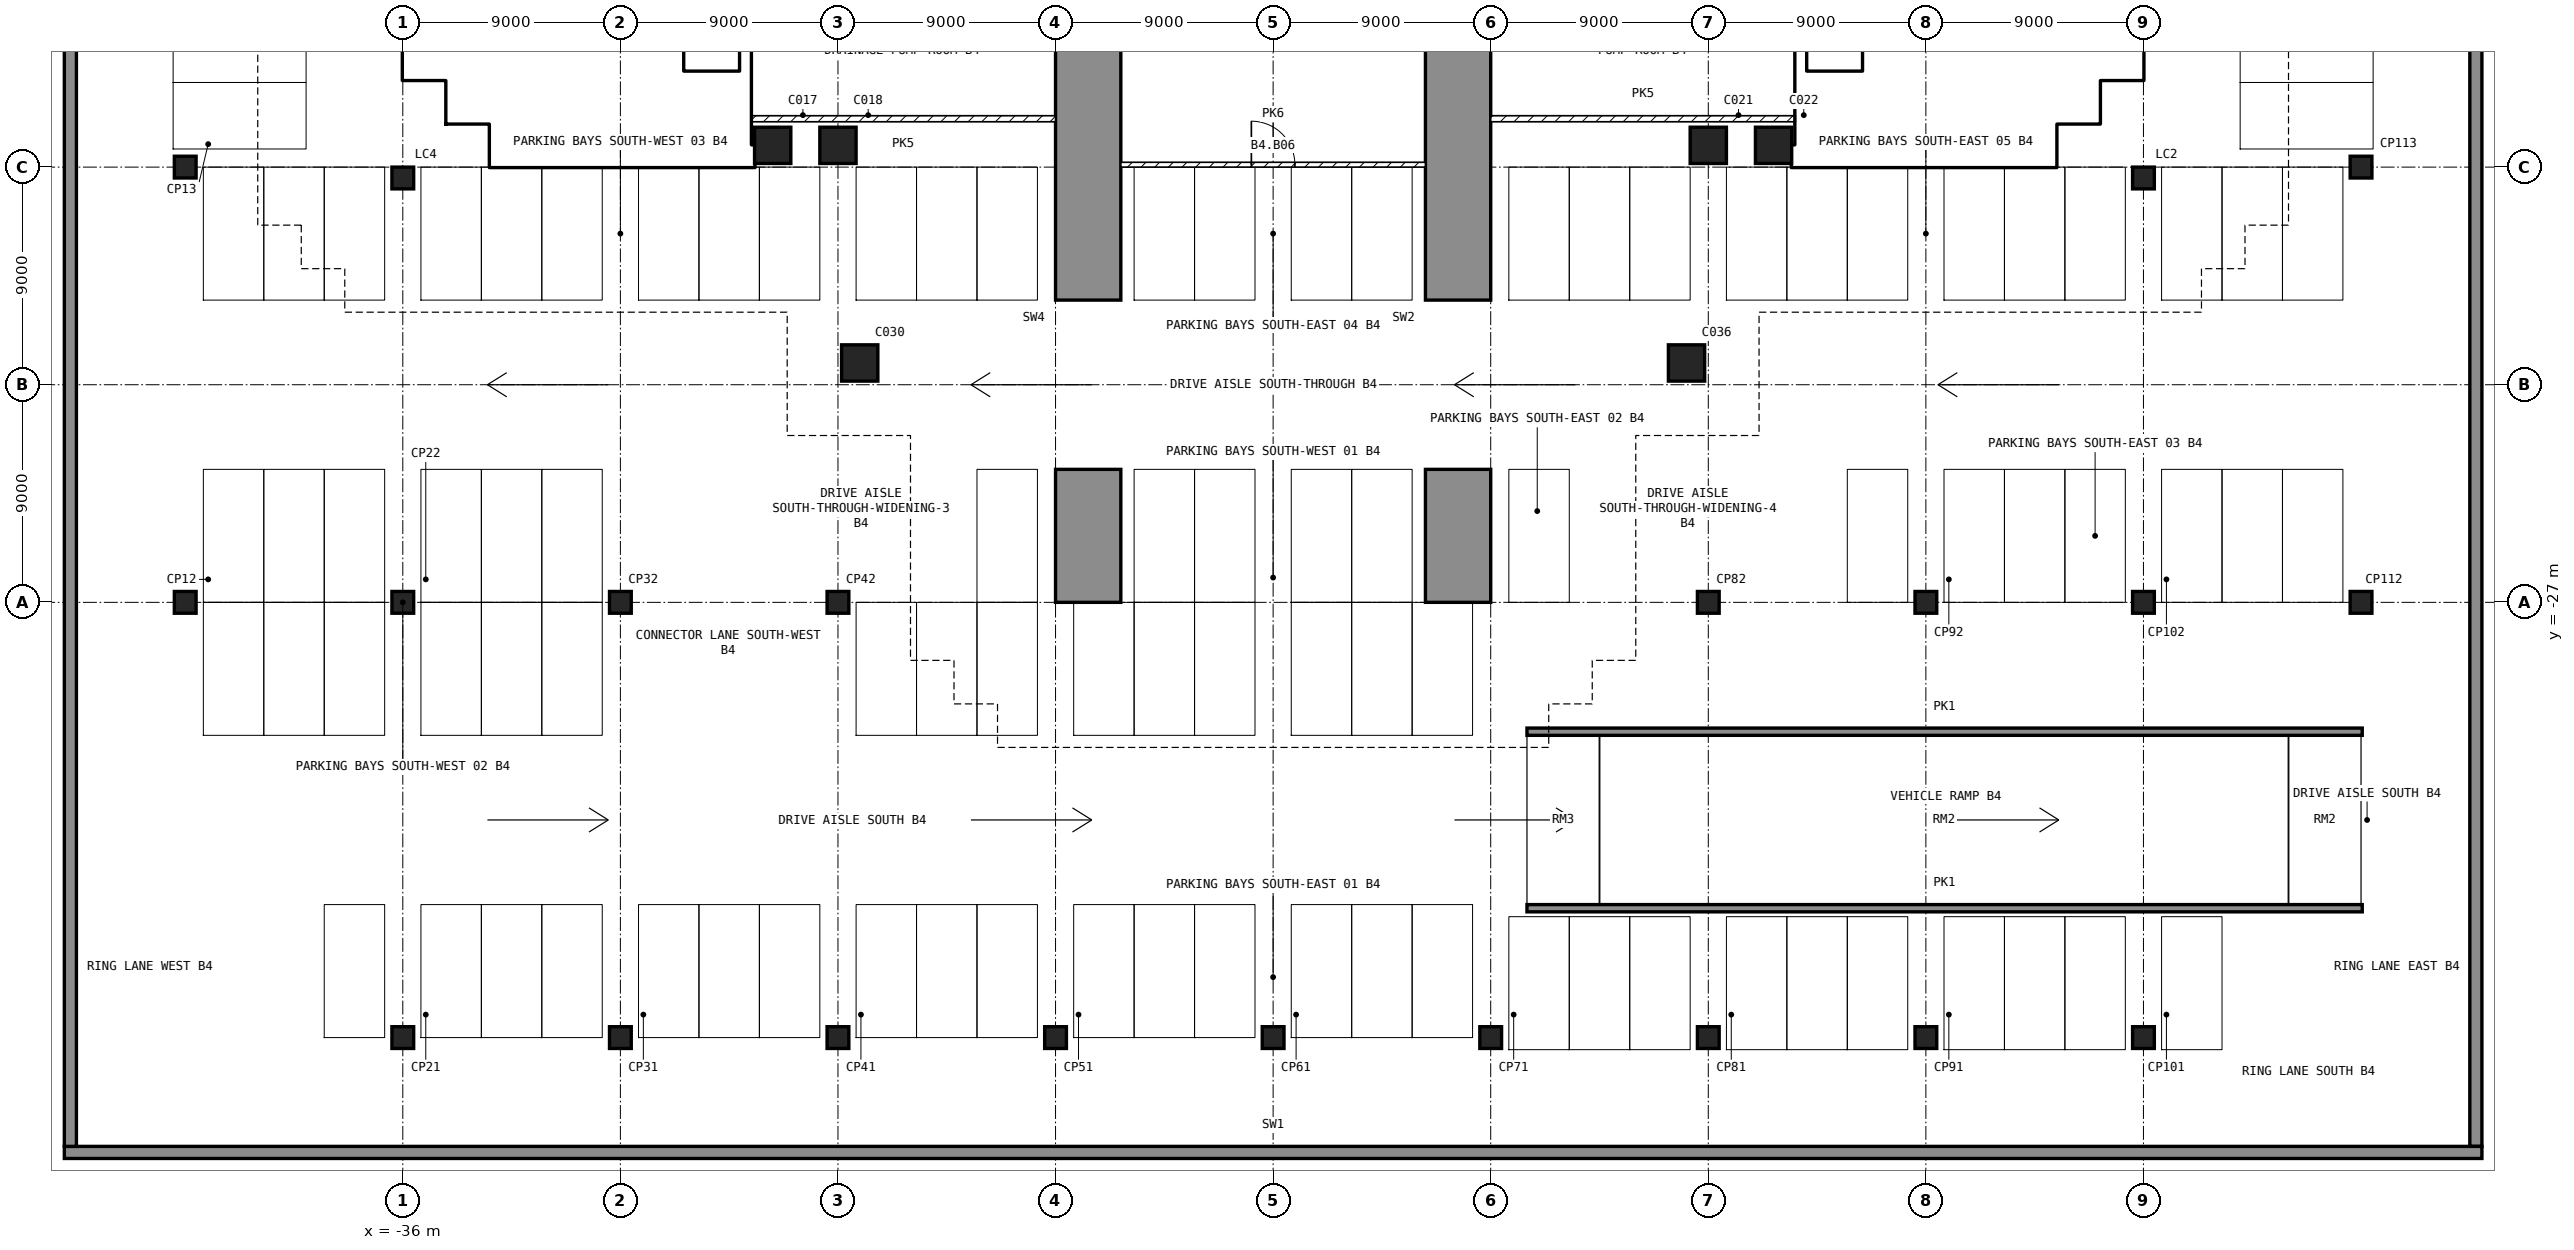
"""IFC4 building model, lengths in metres.
Left out: names, types, materials, properties, quantities, classifications, styles, units other than length and angle.
Written with IfcOpenShell. Run it as: python <this file> out.ifc"""

import sys

from ifc_helpers import new_model, si_unit, direction, frame, frame_2d, origin, origin_2d, place, context, subcontext, project, spatial, polyline, rectangle, outline, extrude, element, fill, save


model = new_model("IFC4")
c1 = context("Model", 3, precision=1e-05, world=origin(), true_north=direction((0.0, 1.0)))
c2 = subcontext(c1, "Body", "Model", "MODEL_VIEW")
j1 = project(units=[si_unit("LENGTHUNIT", "METRE"), si_unit("PLANEANGLEUNIT", "RADIAN")], contexts=[c1])
p1 = place(None, origin())
s1 = spatial("IfcSite", under=j1, at=p1, CompositionType="ELEMENT")
p2 = place(p1, origin())
s2 = spatial("IfcBuilding", under=s1, at=p2, CompositionType="ELEMENT")
p3 = place(p2, frame((0.0, 0.0, -17.1)))
s3 = spatial("IfcBuildingStorey", under=s2, at=p3, CompositionType="ELEMENT", Elevation=-17.1)
p4 = place(p3, frame((-50.0, -49.75, -0.3), z_axis=(0.0, 0.0, 1.0), x_axis=(1.0, 0.0, 0.0)))
e1 = element("IfcWall", 1, at=p4, inside=s3, PredefinedType="SOLIDWALL", context=c2, shape_type="SweptSolid", body=[
    extrude(rectangle(XDim=100.0, YDim=0.5, at=frame_2d((50.0, 0.0))), origin(), (0.0, 0.0, 1.0), 4.2),
])
for number, where, z_axis, x_axis in (
    (2, (49.75, -49.5, -0.3), (0.0, 0.0, 1.0), (0.0, 1.0, 0.0)),
    (3, (-49.75, -49.5, -0.3), (0.0, 0.0, 1.0), (0.0, 1.0, 0.0)),
):
    element("IfcWall", number, at=place(p3, frame(where, z_axis=z_axis, x_axis=x_axis)), inside=s3, PredefinedType="SOLIDWALL", context=c2, shape_type="SweptSolid", body=[
        extrude(rectangle(XDim=99.0, YDim=0.5, at=frame_2d((49.5, 0.0))), origin(), (0.0, 0.0, 1.0), 4.2),
    ])
for number, where, z_axis, x_axis in (
    (4, (-20.7, -8.1, 0.0), (0.0, 0.0, 1.0), (1.0, 0.0, 0.0)),
    (5, (-18.0, -8.1, 0.0), (0.0, 0.0, 1.0), (1.0, 0.0, 0.0)),
    (6, (18.0, -8.1, 0.0), (0.0, 0.0, 1.0), (1.0, 0.0, 0.0)),
    (7, (20.7, -8.1, 0.0), (0.0, 0.0, 1.0), (1.0, 0.0, 0.0)),
    (8, (-17.1, -17.1, 0.0), (0.0, 0.0, 1.0), (1.0, 0.0, 0.0)),
    (9, (17.1, -17.1, 0.0), (0.0, 0.0, 1.0), (1.0, 0.0, 0.0)),
):
    element("IfcColumn", number, at=place(p3, frame(where, z_axis=z_axis, x_axis=x_axis)), inside=s3, PredefinedType="COLUMN", context=c2, shape_type="SweptSolid", body=[
        extrude(rectangle(XDim=1.5, YDim=1.5, at=origin_2d()), origin(), (0.0, 0.0, 1.0), 3.9),
    ])
for number, where, z_axis, x_axis in (
    (10, (-45.0, -27.0, -0.3), (0.0, 0.0, 1.0), (1.0, 0.0, 0.0)),
    (11, (-45.0, -9.0, -0.3), (0.0, 0.0, 1.0), (1.0, 0.0, 0.0)),
    (12, (-36.0, -45.0, -0.3), (0.0, 0.0, 1.0), (1.0, 0.0, 0.0)),
    (13, (-36.0, -27.0, -0.3), (0.0, 0.0, 1.0), (1.0, 0.0, 0.0)),
    (14, (-27.0, -45.0, -0.3), (0.0, 0.0, 1.0), (1.0, 0.0, 0.0)),
    (15, (-27.0, -27.0, -0.3), (0.0, 0.0, 1.0), (1.0, 0.0, 0.0)),
    (16, (-18.0, -45.0, -0.3), (0.0, 0.0, 1.0), (1.0, 0.0, 0.0)),
    (17, (-18.0, -27.0, -0.3), (0.0, 0.0, 1.0), (1.0, 0.0, 0.0)),
    (18, (-9.0, -45.0, -0.3), (0.0, 0.0, 1.0), (1.0, 0.0, 0.0)),
    (19, (0.0, -45.0, -0.3), (0.0, 0.0, 1.0), (1.0, 0.0, 0.0)),
    (20, (9.0, -45.0, -0.3), (0.0, 0.0, 1.0), (1.0, 0.0, 0.0)),
    (21, (18.0, -45.0, -0.3), (0.0, 0.0, 1.0), (1.0, 0.0, 0.0)),
    (22, (18.0, -27.0, -0.3), (0.0, 0.0, 1.0), (1.0, 0.0, 0.0)),
    (23, (27.0, -45.0, -0.3), (0.0, 0.0, 1.0), (1.0, 0.0, 0.0)),
    (24, (27.0, -27.0, -0.3), (0.0, 0.0, 1.0), (1.0, 0.0, 0.0)),
    (25, (36.0, -45.0, -0.3), (0.0, 0.0, 1.0), (1.0, 0.0, 0.0)),
    (26, (36.0, -27.0, -0.3), (0.0, 0.0, 1.0), (1.0, 0.0, 0.0)),
    (27, (45.0, -27.0, -0.3), (0.0, 0.0, 1.0), (1.0, 0.0, 0.0)),
    (28, (45.0, -9.0, -0.3), (0.0, 0.0, 1.0), (1.0, 0.0, 0.0)),
):
    element("IfcColumn", number, at=place(p3, frame(where, z_axis=z_axis, x_axis=x_axis)), inside=s3, PredefinedType="COLUMN", context=c2, shape_type="SweptSolid", body=[
        extrude(rectangle(XDim=0.9, YDim=0.9, at=origin_2d()), origin(), (0.0, 0.0, 1.0), 4.2),
    ])
for number, where, z_axis, x_axis in (
    (29, (36.0, -9.45, 0.0), (0.0, 0.0, 1.0), (1.0, 0.0, 0.0)),
    (30, (-36.0, -9.45, 0.0), (0.0, 0.0, 1.0), (1.0, 0.0, 0.0)),
):
    element("IfcColumn", number, at=place(p3, frame(where, z_axis=z_axis, x_axis=x_axis)), inside=s3, PredefinedType="COLUMN", context=c2, shape_type="SweptSolid", body=[
        extrude(rectangle(XDim=0.9, YDim=0.9, at=origin_2d()), origin(), (0.0, 0.0, 1.0), 3.9),
    ])
for number, where, z_axis, x_axis in (
    (31, (6.3, -27.0, 0.0), (1.0, 0.0, 0.0), (0.0, 1.0, 0.0)),
    (32, (-9.0, -27.0, 0.0), (1.0, 0.0, 0.0), (0.0, 1.0, 0.0)),
):
    element("IfcWall", number, at=place(p3, frame(where, z_axis=z_axis, x_axis=x_axis)), inside=s3, PredefinedType="SOLIDWALL", context=c2, shape_type="SweptSolid", body=[
        extrude(outline(polyline([(0.0, 0.0), (5.5, 0.0), (5.5, 3.0), (12.5, 3.0), (12.5, 0.0), (23.5, 0.0), (23.5, 3.9), (0.0, 3.9), (0.0, 0.0)])), origin(), (0.0, 0.0, 1.0), 2.7),
    ])
p5 = place(p3, frame((21.45, -8.55, 0.0), z_axis=(0.0, 0.0, 1.0), x_axis=(1.0, 0.0, 0.0)))
e33 = element("IfcWall", 33, at=p5, inside=s3, PredefinedType="SHEAR", context=c2, shape_type="SweptSolid", body=[
    extrude(rectangle(XDim=10.95, YDim=0.9, at=frame_2d((5.475, 0.0))), origin(), (0.0, 0.0, 1.0), 3.9),
])
for number, where, z_axis, x_axis in (
    (34, (31.95, -8.1, 0.0), (0.0, 0.0, 1.0), (0.0, 1.0, 0.0)),
    (35, (32.4, -6.75, 0.0), (0.0, 0.0, 1.0), (1.0, 0.0, 0.0)),
):
    element("IfcWall", number, at=place(p3, frame(where, z_axis=z_axis, x_axis=x_axis)), inside=s3, PredefinedType="SHEAR", context=c2, shape_type="SweptSolid", body=[
        extrude(rectangle(XDim=1.8, YDim=0.9, at=frame_2d((0.9, 0.0))), origin(), (0.0, 0.0, 1.0), 3.9),
    ])
p6 = place(p3, frame((33.75, -6.3, 0.0), z_axis=(0.0, 0.0, 1.0), x_axis=(0.0, 1.0, 0.0)))
e36 = element("IfcWall", 36, at=p6, inside=s3, PredefinedType="SHEAR", context=c2, shape_type="SweptSolid", body=[
    extrude(rectangle(XDim=2.25, YDim=0.9, at=frame_2d((1.125, 0.0))), origin(), (0.0, 0.0, 1.0), 3.9),
])
p7 = place(p3, frame((34.2, -4.95, 0.0), z_axis=(0.0, 0.0, 1.0), x_axis=(1.0, 0.0, 0.0)))
e37 = element("IfcWall", 37, at=p7, inside=s3, PredefinedType="SHEAR", context=c2, shape_type="SweptSolid", body=[
    extrude(rectangle(XDim=1.8, YDim=0.9, at=frame_2d((0.9, 0.0))), origin(), (0.0, 0.0, 1.0), 3.9),
])
p8 = place(p3, frame((35.55, -4.5, 0.0), z_axis=(0.0, 0.0, 1.0), x_axis=(0.0, 1.0, 0.0)))
e38 = element("IfcWall", 38, at=p8, inside=s3, PredefinedType="SHEAR", context=c2, shape_type="SweptSolid", body=[
    extrude(rectangle(XDim=9.9, YDim=0.9, at=frame_2d((4.95, 0.0))), origin(), (0.0, 0.0, 1.0), 3.9),
])
p9 = place(p3, frame((21.825, -8.1, 0.0), z_axis=(0.0, 0.0, 1.0), x_axis=(0.0, 1.0, 0.0)))
e39 = element("IfcWall", 39, at=p9, inside=s3, PredefinedType="SHEAR", context=c2, shape_type="SweptSolid", body=[
    extrude(rectangle(XDim=6.9, YDim=0.45, at=frame_2d((3.45, 0.0))), origin(), (0.0, 0.0, 1.0), 3.9),
])
p10 = place(p3, frame((24.5, -5.05, 0.0), z_axis=(0.0, 0.0, 1.0), x_axis=(0.0, 1.0, 0.0)))
e40 = element("IfcWall", 40, at=p10, inside=s3, PredefinedType="SOLIDWALL", context=c2, shape_type="SweptSolid", body=[
    extrude(rectangle(XDim=3.7, YDim=0.2, at=frame_2d((1.85, 0.0))), origin(), (0.0, 0.0, 1.0), 3.9),
])
p11 = place(p10, frame((0.1, 0.0, 0.0)))
e41 = element("IfcOpeningElement", 41, at=p11, cuts=e40, PredefinedType="OPENING", context=c2, shape_type="SweptSolid", body=[
    extrude(rectangle(XDim=0.8, YDim=2.1, at=frame_2d((0.4, 1.05))), frame((0.0, 0.11, 0.0), z_axis=(0.0, -1.0, 0.0), x_axis=(1.0, 0.0, 0.0)), (0.0, 0.0, 1.0), 0.22),
])
p12 = place(p3, frame((22.05, -5.15, 0.0), z_axis=(0.0, 0.0, 1.0), x_axis=(1.0, 0.0, 0.0)))
e42 = element("IfcWall", 42, at=p12, inside=s3, PredefinedType="SOLIDWALL", context=c2, shape_type="SweptSolid", body=[
    extrude(rectangle(XDim=6.3, YDim=0.2, at=frame_2d((3.15, 0.0))), origin(), (0.0, 0.0, 1.0), 3.9),
])
p13 = place(p12, frame((0.2, 0.0, 0.0)))
e43 = element("IfcOpeningElement", 43, at=p13, cuts=e42, PredefinedType="OPENING", context=c2, shape_type="SweptSolid", body=[
    extrude(rectangle(XDim=1.0, YDim=2.1, at=frame_2d((0.5, 1.05))), frame((0.0, 0.11, 0.0), z_axis=(0.0, -1.0, 0.0), x_axis=(1.0, 0.0, 0.0)), (0.0, 0.0, 1.0), 0.22),
])
p14 = place(p3, frame((28.25, -8.1, 0.0), z_axis=(0.0, 0.0, 1.0), x_axis=(0.0, 1.0, 0.0)))
e44 = element("IfcWall", 44, at=p14, inside=s3, PredefinedType="SOLIDWALL", context=c2, shape_type="SweptSolid", body=[
    extrude(rectangle(XDim=2.85, YDim=0.2, at=frame_2d((1.425, 0.0))), origin(), (0.0, 0.0, 1.0), 3.9),
])
p15 = place(p3, frame((-32.4, -8.55, 0.0), z_axis=(0.0, 0.0, 1.0), x_axis=(1.0, 0.0, 0.0)))
e45 = element("IfcWall", 45, at=p15, inside=s3, PredefinedType="SHEAR", context=c2, shape_type="SweptSolid", body=[
    extrude(rectangle(XDim=10.95, YDim=0.9, at=frame_2d((5.475, 0.0))), origin(), (0.0, 0.0, 1.0), 3.9),
])
for number, where, z_axis, x_axis in (
    (46, (-31.95, -8.1, 0.0), (0.0, 0.0, 1.0), (0.0, 1.0, 0.0)),
    (47, (-34.2, -6.75, 0.0), (0.0, 0.0, 1.0), (1.0, 0.0, 0.0)),
):
    element("IfcWall", number, at=place(p3, frame(where, z_axis=z_axis, x_axis=x_axis)), inside=s3, PredefinedType="SHEAR", context=c2, shape_type="SweptSolid", body=[
        extrude(rectangle(XDim=1.8, YDim=0.9, at=frame_2d((0.9, 0.0))), origin(), (0.0, 0.0, 1.0), 3.9),
    ])
p16 = place(p3, frame((-33.75, -6.3, 0.0), z_axis=(0.0, 0.0, 1.0), x_axis=(0.0, 1.0, 0.0)))
e48 = element("IfcWall", 48, at=p16, inside=s3, PredefinedType="SHEAR", context=c2, shape_type="SweptSolid", body=[
    extrude(rectangle(XDim=2.25, YDim=0.9, at=frame_2d((1.125, 0.0))), origin(), (0.0, 0.0, 1.0), 3.9),
])
p17 = place(p3, frame((-36.0, -4.95, 0.0), z_axis=(0.0, 0.0, 1.0), x_axis=(1.0, 0.0, 0.0)))
e49 = element("IfcWall", 49, at=p17, inside=s3, PredefinedType="SHEAR", context=c2, shape_type="SweptSolid", body=[
    extrude(rectangle(XDim=1.8, YDim=0.9, at=frame_2d((0.9, 0.0))), origin(), (0.0, 0.0, 1.0), 3.9),
])
p18 = place(p3, frame((-35.55, -4.5, 0.0), z_axis=(0.0, 0.0, 1.0), x_axis=(0.0, 1.0, 0.0)))
e50 = element("IfcWall", 50, at=p18, inside=s3, PredefinedType="SHEAR", context=c2, shape_type="SweptSolid", body=[
    extrude(rectangle(XDim=9.9, YDim=0.9, at=frame_2d((4.95, 0.0))), origin(), (0.0, 0.0, 1.0), 3.9),
])
p19 = place(p3, frame((-21.825, -8.1, 0.0), z_axis=(0.0, 0.0, 1.0), x_axis=(0.0, 1.0, 0.0)))
e51 = element("IfcWall", 51, at=p19, inside=s3, PredefinedType="SHEAR", context=c2, shape_type="SweptSolid", body=[
    extrude(rectangle(XDim=6.9, YDim=0.45, at=frame_2d((3.45, 0.0))), origin(), (0.0, 0.0, 1.0), 3.9),
])
p20 = place(p3, frame((-24.5, -5.05, 0.0), z_axis=(0.0, 0.0, 1.0), x_axis=(0.0, 1.0, 0.0)))
e52 = element("IfcWall", 52, at=p20, inside=s3, PredefinedType="SOLIDWALL", context=c2, shape_type="SweptSolid", body=[
    extrude(rectangle(XDim=3.7, YDim=0.2, at=frame_2d((1.85, 0.0))), origin(), (0.0, 0.0, 1.0), 3.9),
])
p21 = place(p20, frame((0.1, 0.0, 0.0)))
e53 = element("IfcOpeningElement", 53, at=p21, cuts=e52, PredefinedType="OPENING", context=c2, shape_type="SweptSolid", body=[
    extrude(rectangle(XDim=0.8, YDim=2.1, at=frame_2d((0.4, 1.05))), frame((0.0, 0.11, 0.0), z_axis=(0.0, -1.0, 0.0), x_axis=(1.0, 0.0, 0.0)), (0.0, 0.0, 1.0), 0.22),
])
p22 = place(p3, frame((-28.35, -5.15, 0.0), z_axis=(0.0, 0.0, 1.0), x_axis=(1.0, 0.0, 0.0)))
e54 = element("IfcWall", 54, at=p22, inside=s3, PredefinedType="SOLIDWALL", context=c2, shape_type="SweptSolid", body=[
    extrude(rectangle(XDim=6.3, YDim=0.2, at=frame_2d((3.15, 0.0))), origin(), (0.0, 0.0, 1.0), 3.9),
])
p23 = place(p22, frame((5.1, 0.0, 0.0)))
e55 = element("IfcOpeningElement", 55, at=p23, cuts=e54, PredefinedType="OPENING", context=c2, shape_type="SweptSolid", body=[
    extrude(rectangle(XDim=1.0, YDim=2.1, at=frame_2d((0.5, 1.05))), frame((0.0, 0.11, 0.0), z_axis=(0.0, -1.0, 0.0), x_axis=(1.0, 0.0, 0.0)), (0.0, 0.0, 1.0), 0.22),
])
p24 = place(p3, frame((-28.25, -8.1, 0.0), z_axis=(0.0, 0.0, 1.0), x_axis=(0.0, 1.0, 0.0)))
e56 = element("IfcWall", 56, at=p24, inside=s3, PredefinedType="SOLIDWALL", context=c2, shape_type="SweptSolid", body=[
    extrude(rectangle(XDim=2.85, YDim=0.2, at=frame_2d((1.425, 0.0))), origin(), (0.0, 0.0, 1.0), 3.9),
])
for number, where, z_axis, x_axis in (
    (57, (10.5, -39.65, 0.0), (0.0, 0.0, 1.0), (1.0, 0.0, 0.0)),
    (58, (10.5, -32.35, 0.0), (0.0, 0.0, 1.0), (1.0, 0.0, 0.0)),
):
    element("IfcWall", number, at=place(p3, frame(where, z_axis=z_axis, x_axis=x_axis)), inside=s3, PredefinedType="SOLIDWALL", context=c2, shape_type="SweptSolid", body=[
        extrude(rectangle(XDim=34.55, YDim=0.3, at=frame_2d((17.275, 0.0))), origin(), (0.0, 0.0, 1.0), 4.2),
    ])
for number, where, z_axis, x_axis in (
    (59, (9.0, -7.0, 0.0), (0.0, 0.0, 1.0), (1.0, 0.0, 0.0)),
    (60, (-9.0, -7.0, 0.0), (0.0, 0.0, 1.0), (-1.0, 0.0, 0.0)),
):
    element("IfcWall", number, at=place(p3, frame(where, z_axis=z_axis, x_axis=x_axis)), inside=s3, PredefinedType="SOLIDWALL", context=c2, shape_type="SweptSolid", body=[
        extrude(rectangle(XDim=12.6, YDim=0.25, at=frame_2d((6.3, 0.0))), origin(), (0.0, 0.0, 1.0), 3.9),
    ])
p25 = place(p3, frame((-6.3, -8.9, 0.0), z_axis=(0.0, 0.0, 1.0), x_axis=(1.0, 0.0, 0.0)))
e61 = element("IfcWall", 61, at=p25, inside=s3, PredefinedType="PARTITIONING", context=c2, shape_type="SweptSolid", body=[
    extrude(rectangle(XDim=12.6, YDim=0.2, at=frame_2d((6.3, 0.0))), origin(), (0.0, 0.0, 1.0), 3.9),
])
p26 = place(p25, frame((5.4, 0.0, 0.0)))
e62 = element("IfcOpeningElement", 62, at=p26, cuts=e61, PredefinedType="OPENING", context=c2, shape_type="SweptSolid", body=[
    extrude(rectangle(XDim=1.8, YDim=2.1, at=frame_2d((0.9, 1.05))), frame((0.0, 0.11, 0.0), z_axis=(0.0, -1.0, 0.0), x_axis=(1.0, 0.0, 0.0)), (0.0, 0.0, 1.0), 0.22),
])
p27 = place(p13, origin())
e63 = element("IfcDoor", 63, at=p27, inside=s3, OperationType="SINGLE_SWING_LEFT", PredefinedType="DOOR", context=c2, shape_type="SweptSolid", body=[
    extrude(rectangle(XDim=1.0, YDim=2.1, at=frame_2d((0.5, 1.05))), frame((0.0, 0.025, 0.0), z_axis=(0.0, -1.0, 0.0), x_axis=(1.0, 0.0, 0.0)), (0.0, 0.0, 1.0), 0.05),
])
fill(e43, e63)
p28 = place(p11, origin())
e64 = element("IfcDoor", 64, at=p28, inside=s3, OperationType="SINGLE_SWING_LEFT", PredefinedType="DOOR", context=c2, shape_type="SweptSolid", body=[
    extrude(rectangle(XDim=0.8, YDim=2.1, at=frame_2d((0.4, 1.05))), frame((0.0, 0.025, 0.0), z_axis=(0.0, -1.0, 0.0), x_axis=(1.0, 0.0, 0.0)), (0.0, 0.0, 1.0), 0.05),
])
fill(e41, e64)
p29 = place(p23, origin())
e65 = element("IfcDoor", 65, at=p29, inside=s3, OperationType="SINGLE_SWING_LEFT", PredefinedType="DOOR", context=c2, shape_type="SweptSolid", body=[
    extrude(rectangle(XDim=1.0, YDim=2.1, at=frame_2d((0.5, 1.05))), frame((0.0, 0.025, 0.0), z_axis=(0.0, -1.0, 0.0), x_axis=(1.0, 0.0, 0.0)), (0.0, 0.0, 1.0), 0.05),
])
fill(e55, e65)
p30 = place(p21, origin())
e66 = element("IfcDoor", 66, at=p30, inside=s3, OperationType="SINGLE_SWING_LEFT", PredefinedType="DOOR", context=c2, shape_type="SweptSolid", body=[
    extrude(rectangle(XDim=0.8, YDim=2.1, at=frame_2d((0.4, 1.05))), frame((0.0, 0.025, 0.0), z_axis=(0.0, -1.0, 0.0), x_axis=(1.0, 0.0, 0.0)), (0.0, 0.0, 1.0), 0.05),
])
fill(e53, e66)
p31 = place(p26, origin())
e67 = element("IfcDoor", 67, at=p31, inside=s3, OperationType="SINGLE_SWING_LEFT", PredefinedType="DOOR", context=c2, shape_type="SweptSolid", body=[
    extrude(rectangle(XDim=1.8, YDim=2.1, at=frame_2d((0.9, 1.05))), frame((0.0, 0.025, 0.0), z_axis=(0.0, -1.0, 0.0), x_axis=(1.0, 0.0, 0.0)), (0.0, 0.0, 1.0), 0.05),
])
fill(e62, e67)
save(model, sys.argv[1])
